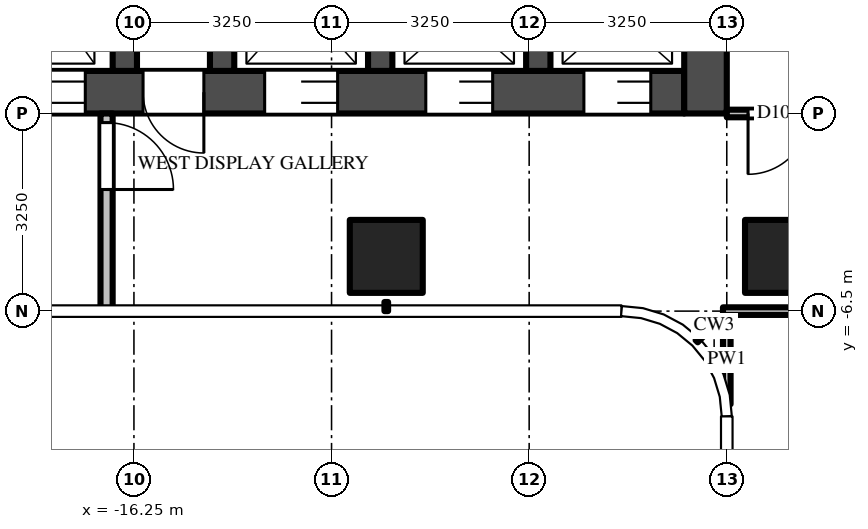
"""IFC4 building model, lengths in metres.
Left out: names, types, materials, properties, quantities, classifications, styles, units other than length and angle.
Written with IfcOpenShell. Run it as: python <this file> out.ifc"""

import sys

from ifc_helpers import new_model, si_unit, direction, frame, frame_2d, origin, origin_2d, place, context, subcontext, project, spatial, rectangle, extrude, source, transform, mapped, element, fill, save


model = new_model("IFC4")
c1 = context("Model", 3, precision=1e-05, world=origin(), true_north=direction((0.0, 1.0)))
c2 = subcontext(c1, "Body", "Model", "MODEL_VIEW")
j1 = project(units=[si_unit("LENGTHUNIT", "METRE"), si_unit("PLANEANGLEUNIT", "RADIAN")], contexts=[c1])
p1 = place(None, origin())
s1 = spatial("IfcSite", under=j1, at=p1, CompositionType="ELEMENT")
p2 = place(p1, origin())
s2 = spatial("IfcBuilding", under=s1, at=p2, CompositionType="ELEMENT")
p3 = place(p2, frame((0.0, 0.0, 208.8)))
s3 = spatial("IfcBuildingStorey", under=s2, at=p3, CompositionType="ELEMENT", Elevation=208.8)
m1 = source(origin(), c2, "Body", "SweptSolid", [
    extrude(rectangle(XDim=1.2, YDim=1.2, at=origin_2d()), origin(), (0.0, 0.0, 1.0), 3.9),
])
for number, where, z_axis, x_axis in (
    (1, (-5.6, -5.6, 0.0), (0.0, 0.0, 1.0), (1.0, 0.0, 0.0)),
    (2, (-12.1, -5.6, 0.0), (0.0, 0.0, 1.0), (1.0, 0.0, 0.0)),
):
    element("IfcColumn", number, at=place(p3, frame(where, z_axis=z_axis, x_axis=x_axis)), inside=s3, PredefinedType="COLUMN", context=c2, shape_type="MappedRepresentation", body=[
        mapped(m1, transform((0.0, 0.0, 0.0))),
    ])
m2 = source(origin(), c2, "Body", "SweptSolid", [
    extrude(rectangle(XDim=14.85, YDim=0.7, at=frame_2d((7.425, 0.0))), origin(), (0.0, 0.0, 1.0), 3.45),
])
p4 = place(p3, frame((-7.2, -2.9, 0.0), z_axis=(0.0, 0.0, 1.0), x_axis=(-1.0, 0.0, 0.0)))
e3 = element("IfcWall", 3, at=p4, inside=s3, PredefinedType="SHEAR", context=c2, shape_type="MappedRepresentation", body=[
    mapped(m2, transform((0.0, 0.0, 0.0))),
])
m3 = source(origin(), c2, "Body", "SweptSolid", [
    extrude(rectangle(XDim=1.1, YDim=2.1, at=frame_2d((0.55, 1.05))), frame((0.0, 0.36, 0.0), z_axis=(0.0, -1.0, 0.0), x_axis=(1.0, 0.0, 0.0)), (0.0, 0.0, 1.0), 0.72),
])
p5 = place(p4, frame((0.55, 0.0, 0.0)))
e4 = element("IfcOpeningElement", 4, at=p5, cuts=e3, PredefinedType="OPENING", context=c2, shape_type="MappedRepresentation", body=[
    mapped(m3, transform((0.0, 0.0, 0.0))),
])
p6 = place(p4, frame((3.15, 0.0, 0.0)))
e5 = element("IfcOpeningElement", 5, at=p6, cuts=e3, PredefinedType="OPENING", context=c2, shape_type="MappedRepresentation", body=[
    mapped(m3, transform((0.0, 0.0, 0.0))),
])
m4 = source(origin(), c2, "Body", "SweptSolid", [
    extrude(rectangle(XDim=1.2, YDim=2.1, at=frame_2d((0.6, 1.05))), frame((0.0, 0.36, 0.0), z_axis=(0.0, -1.0, 0.0), x_axis=(1.0, 0.0, 0.0)), (0.0, 0.0, 1.0), 0.72),
])
p7 = place(p4, frame((5.7, 0.0, 0.0)))
e6 = element("IfcOpeningElement", 6, at=p7, cuts=e3, PredefinedType="OPENING", context=c2, shape_type="MappedRepresentation", body=[
    mapped(m4, transform((0.0, 0.0, 0.0))),
])
m5 = source(origin(), c2, "Body", "SweptSolid", [
    extrude(rectangle(XDim=1.3, YDim=2.1, at=frame_2d((0.65, 1.05))), frame((0.0, 0.36, 0.0), z_axis=(0.0, -1.0, 0.0), x_axis=(1.0, 0.0, 0.0)), (0.0, 0.0, 1.0), 0.72),
])
p8 = place(p4, frame((12.2, 0.0, 0.0)))
e7 = element("IfcOpeningElement", 7, at=p8, cuts=e3, PredefinedType="OPENING", context=c2, shape_type="MappedRepresentation", body=[
    mapped(m5, transform((0.0, 0.0, 0.0))),
])
p9 = place(p4, frame((9.85, 0.0, 0.0)))
e8 = element("IfcOpeningElement", 8, at=p9, cuts=e3, PredefinedType="OPENING", context=c2, shape_type="MappedRepresentation", body=[
    mapped(m4, transform((0.0, 0.0, 0.0))),
])
m6 = source(origin(), c2, "Body", "SweptSolid", [
    extrude(rectangle(XDim=1.0, YDim=2.1, at=frame_2d((0.5, 1.05))), frame((0.0, 0.36, 0.0), z_axis=(0.0, -1.0, 0.0), x_axis=(1.0, 0.0, 0.0)), (0.0, 0.0, 1.0), 0.72),
])
p10 = place(p4, frame((7.9, 0.0, 0.0)))
e9 = element("IfcOpeningElement", 9, at=p10, cuts=e3, PredefinedType="OPENING", context=c2, shape_type="MappedRepresentation", body=[
    mapped(m6, transform((0.0, 0.0, 0.0))),
])
m7 = source(origin(), c2, "Body", "SweptSolid", [
    extrude(rectangle(XDim=9.05, YDim=0.7, at=frame_2d((4.525, 0.0))), origin(), (0.0, 0.0, 1.0), 3.45),
])
p11 = place(p3, frame((-6.85, 5.8, 0.0), z_axis=(0.0, 0.0, 1.0), x_axis=(0.0, -1.0, 0.0)))
e10 = element("IfcWall", 10, at=p11, inside=s3, PredefinedType="SHEAR", context=c2, shape_type="MappedRepresentation", body=[
    mapped(m7, transform((0.0, 0.0, 0.0))),
])
m8 = source(origin(), c2, "Body", "SweptSolid", [
    extrude(rectangle(XDim=1.8, YDim=2.1, at=frame_2d((0.9, 1.05))), frame((0.0, 0.36, 0.0), z_axis=(0.0, -1.0, 0.0), x_axis=(1.0, 0.0, 0.0)), (0.0, 0.0, 1.0), 0.72),
])
p12 = place(p11, frame((3.15, 0.0, 0.0)))
e11 = element("IfcOpeningElement", 11, at=p12, cuts=e10, PredefinedType="OPENING", context=c2, shape_type="MappedRepresentation", body=[
    mapped(m8, transform((0.0, 0.0, 0.0))),
])
m9 = source(origin(), c2, "Body", "SweptSolid", [
    extrude(rectangle(XDim=2.45, YDim=0.4, at=frame_2d((1.225, 0.0))), origin(), (0.0, 0.0, 1.0), 3.45),
])
for number, where, z_axis, x_axis in (
    (12, (-9.6, -0.1, 0.0), (0.0, 0.0, 1.0), (0.0, -1.0, 0.0)),
    (13, (-12.2, -0.1, 0.0), (0.0, 0.0, 1.0), (0.0, -1.0, 0.0)),
    (14, (-14.8, -0.1, 0.0), (0.0, 0.0, 1.0), (0.0, -1.0, 0.0)),
    (15, (-16.4, -0.1, 0.0), (0.0, 0.0, 1.0), (0.0, -1.0, 0.0)),
):
    element("IfcWall", number, at=place(p3, frame(where, z_axis=z_axis, x_axis=x_axis)), inside=s3, PredefinedType="SHEAR", context=c2, shape_type="MappedRepresentation", body=[
        mapped(m9, transform((0.0, 0.0, 0.0))),
    ])
m10 = source(origin(), c2, "Body", "SweptSolid", [
    extrude(rectangle(XDim=3.25, YDim=0.2, at=frame_2d((1.625, 0.0))), origin(), (0.0, 0.0, 1.0), 3.45),
])
p13 = place(p3, frame((-16.7, -3.25, 0.0), z_axis=(0.0, 0.0, 1.0), x_axis=(0.0, -1.0, 0.0)))
e16 = element("IfcWall", 16, at=p13, inside=s3, PredefinedType="PARTITIONING", context=c2, shape_type="MappedRepresentation", body=[
    mapped(m10, transform((0.0, 0.0, 0.0))),
])
m11 = source(origin(), c2, "Body", "SweptSolid", [
    extrude(rectangle(XDim=1.1, YDim=2.1, at=frame_2d((0.55, 1.05))), frame((0.0, 0.11, 0.0), z_axis=(0.0, -1.0, 0.0), x_axis=(1.0, 0.0, 0.0)), (0.0, 0.0, 1.0), 0.22),
])
p14 = place(p13, frame((0.15, 0.0, 0.0)))
e17 = element("IfcOpeningElement", 17, at=p14, cuts=e16, PredefinedType="OPENING", context=c2, shape_type="MappedRepresentation", body=[
    mapped(m11, transform((0.0, 0.0, 0.0))),
])
m12 = source(origin(), c2, "Body", "SweptSolid", [
    extrude(rectangle(XDim=1.469, YDim=0.125, at=frame_2d((0.734, 0.0))), origin(), (0.0, 0.0, 1.0), 3.45),
])
p15 = place(p3, frame((-6.5, -6.562, 0.0), z_axis=(0.0, 0.0, 1.0), x_axis=(0.0, -1.0, 0.0)))
e18 = element("IfcWall", 18, at=p15, inside=s3, PredefinedType="PARTITIONING", context=c2, shape_type="MappedRepresentation", body=[
    mapped(m12, transform((0.0, 0.0, 0.0))),
])
m13 = source(origin(), c2, "Body", "SweptSolid", [
    extrude(rectangle(XDim=3.725, YDim=0.125, at=frame_2d((1.863, 0.0))), origin(), (0.0, 0.0, 1.0), 2.53),
])
p16 = place(p3, frame((-2.837, -6.5, 0.0), z_axis=(0.0, 0.0, 1.0), x_axis=(-1.0, 0.0, 0.0)))
e19 = element("IfcWall", 19, at=p16, inside=s3, PredefinedType="PARTITIONING", context=c2, shape_type="MappedRepresentation", body=[
    mapped(m13, transform((0.0, 0.0, 0.0))),
])
m14 = source(origin(), c2, "Body", "SweptSolid", [
    extrude(rectangle(XDim=5.363, YDim=0.125, at=frame_2d((2.681, 0.0))), origin(), (0.0, 0.0, 1.0), 2.668),
])
p17 = place(p3, frame((-1.137, -3.25, 0.0), z_axis=(0.0, 0.0, 1.0), x_axis=(-1.0, 0.0, 0.0)))
e20 = element("IfcWall", 20, at=p17, inside=s3, PredefinedType="PARTITIONING", context=c2, shape_type="MappedRepresentation", body=[
    mapped(m14, transform((0.0, 0.0, 0.0))),
])
m15 = source(origin(), c2, "Body", "SweptSolid", [
    extrude(rectangle(XDim=1.0, YDim=2.1, at=frame_2d((0.5, 1.05))), frame((0.0, 0.073, 0.0), z_axis=(0.0, -1.0, 0.0), x_axis=(1.0, 0.0, 0.0)), (0.0, 0.0, 1.0), 0.145),
])
p18 = place(p17, frame((4.012, 0.0, 0.0)))
e21 = element("IfcOpeningElement", 21, at=p18, cuts=e20, PredefinedType="OPENING", context=c2, shape_type="MappedRepresentation", body=[
    mapped(m15, transform((0.0, 0.0, 0.0))),
])
m16 = source(origin(), c2, "Body", "SweptSolid", [
    extrude(rectangle(XDim=1.1, YDim=2.1, at=frame_2d((0.55, 1.05))), frame((0.0, -0.275, 0.0), z_axis=(0.0, -1.0, 0.0), x_axis=(1.0, 0.0, 0.0)), (0.0, 0.0, 1.0), 0.05),
])
p19 = place(p5, origin())
e22 = element("IfcDoor", 22, at=p19, inside=s3, OperationType="DOUBLE_DOOR_SLIDING", PredefinedType="DOOR", context=c2, shape_type="MappedRepresentation", body=[
    mapped(m16, transform((0.0, 0.0, 0.0))),
])
fill(e4, e22)
p20 = place(p6, origin())
e23 = element("IfcDoor", 23, at=p20, inside=s3, OperationType="DOUBLE_DOOR_SLIDING", PredefinedType="DOOR", context=c2, shape_type="MappedRepresentation", body=[
    mapped(m16, transform((0.0, 0.0, 0.0))),
])
fill(e5, e23)
m17 = source(origin(), c2, "Body", "SweptSolid", [
    extrude(rectangle(XDim=1.2, YDim=2.1, at=frame_2d((0.6, 1.05))), frame((0.0, -0.275, 0.0), z_axis=(0.0, -1.0, 0.0), x_axis=(1.0, 0.0, 0.0)), (0.0, 0.0, 1.0), 0.05),
])
p21 = place(p7, origin())
e24 = element("IfcDoor", 24, at=p21, inside=s3, OperationType="DOUBLE_DOOR_SLIDING", PredefinedType="DOOR", context=c2, shape_type="MappedRepresentation", body=[
    mapped(m17, transform((0.0, 0.0, 0.0))),
])
fill(e6, e24)
p22 = place(p9, origin())
e25 = element("IfcDoor", 25, at=p22, inside=s3, OperationType="DOUBLE_DOOR_SLIDING", PredefinedType="DOOR", context=c2, shape_type="MappedRepresentation", body=[
    mapped(m17, transform((0.0, 0.0, 0.0))),
])
fill(e8, e25)
m18 = source(origin(), c2, "Body", "SweptSolid", [
    extrude(rectangle(XDim=1.0, YDim=2.1, at=frame_2d((0.5, 1.05))), frame((0.0, -0.275, 0.0), z_axis=(0.0, -1.0, 0.0), x_axis=(1.0, 0.0, 0.0)), (0.0, 0.0, 1.0), 0.05),
])
p23 = place(p10, origin())
e26 = element("IfcDoor", 26, at=p23, inside=s3, OperationType="SINGLE_SWING_LEFT", PredefinedType="DOOR", context=c2, shape_type="MappedRepresentation", body=[
    mapped(m18, transform((0.0, 0.0, 0.0))),
])
fill(e9, e26)
m19 = source(origin(), c2, "Body", "SweptSolid", [
    extrude(rectangle(XDim=1.1, YDim=2.1, at=frame_2d((0.55, 1.05))), frame((0.0, 0.025, 0.0), z_axis=(0.0, -1.0, 0.0), x_axis=(1.0, 0.0, 0.0)), (0.0, 0.0, 1.0), 0.05),
])
p24 = place(p14, origin())
e27 = element("IfcDoor", 27, at=p24, inside=s3, OperationType="SINGLE_SWING_RIGHT", PredefinedType="DOOR", context=c2, shape_type="MappedRepresentation", body=[
    mapped(m19, transform((0.0, 0.0, 0.0))),
])
fill(e17, e27)
m20 = source(origin(), c2, "Body", "SweptSolid", [
    extrude(rectangle(XDim=1.0, YDim=2.1, at=frame_2d((0.5, 1.05))), frame((0.0, 0.025, 0.0), z_axis=(0.0, -1.0, 0.0), x_axis=(1.0, 0.0, 0.0)), (0.0, 0.0, 1.0), 0.05),
])
p25 = place(p18, origin())
e28 = element("IfcDoor", 28, at=p25, inside=s3, OperationType="SINGLE_SWING_RIGHT", PredefinedType="DOOR", context=c2, shape_type="MappedRepresentation", body=[
    mapped(m20, transform((0.0, 0.0, 0.0))),
])
fill(e21, e28)
save(model, sys.argv[1])
